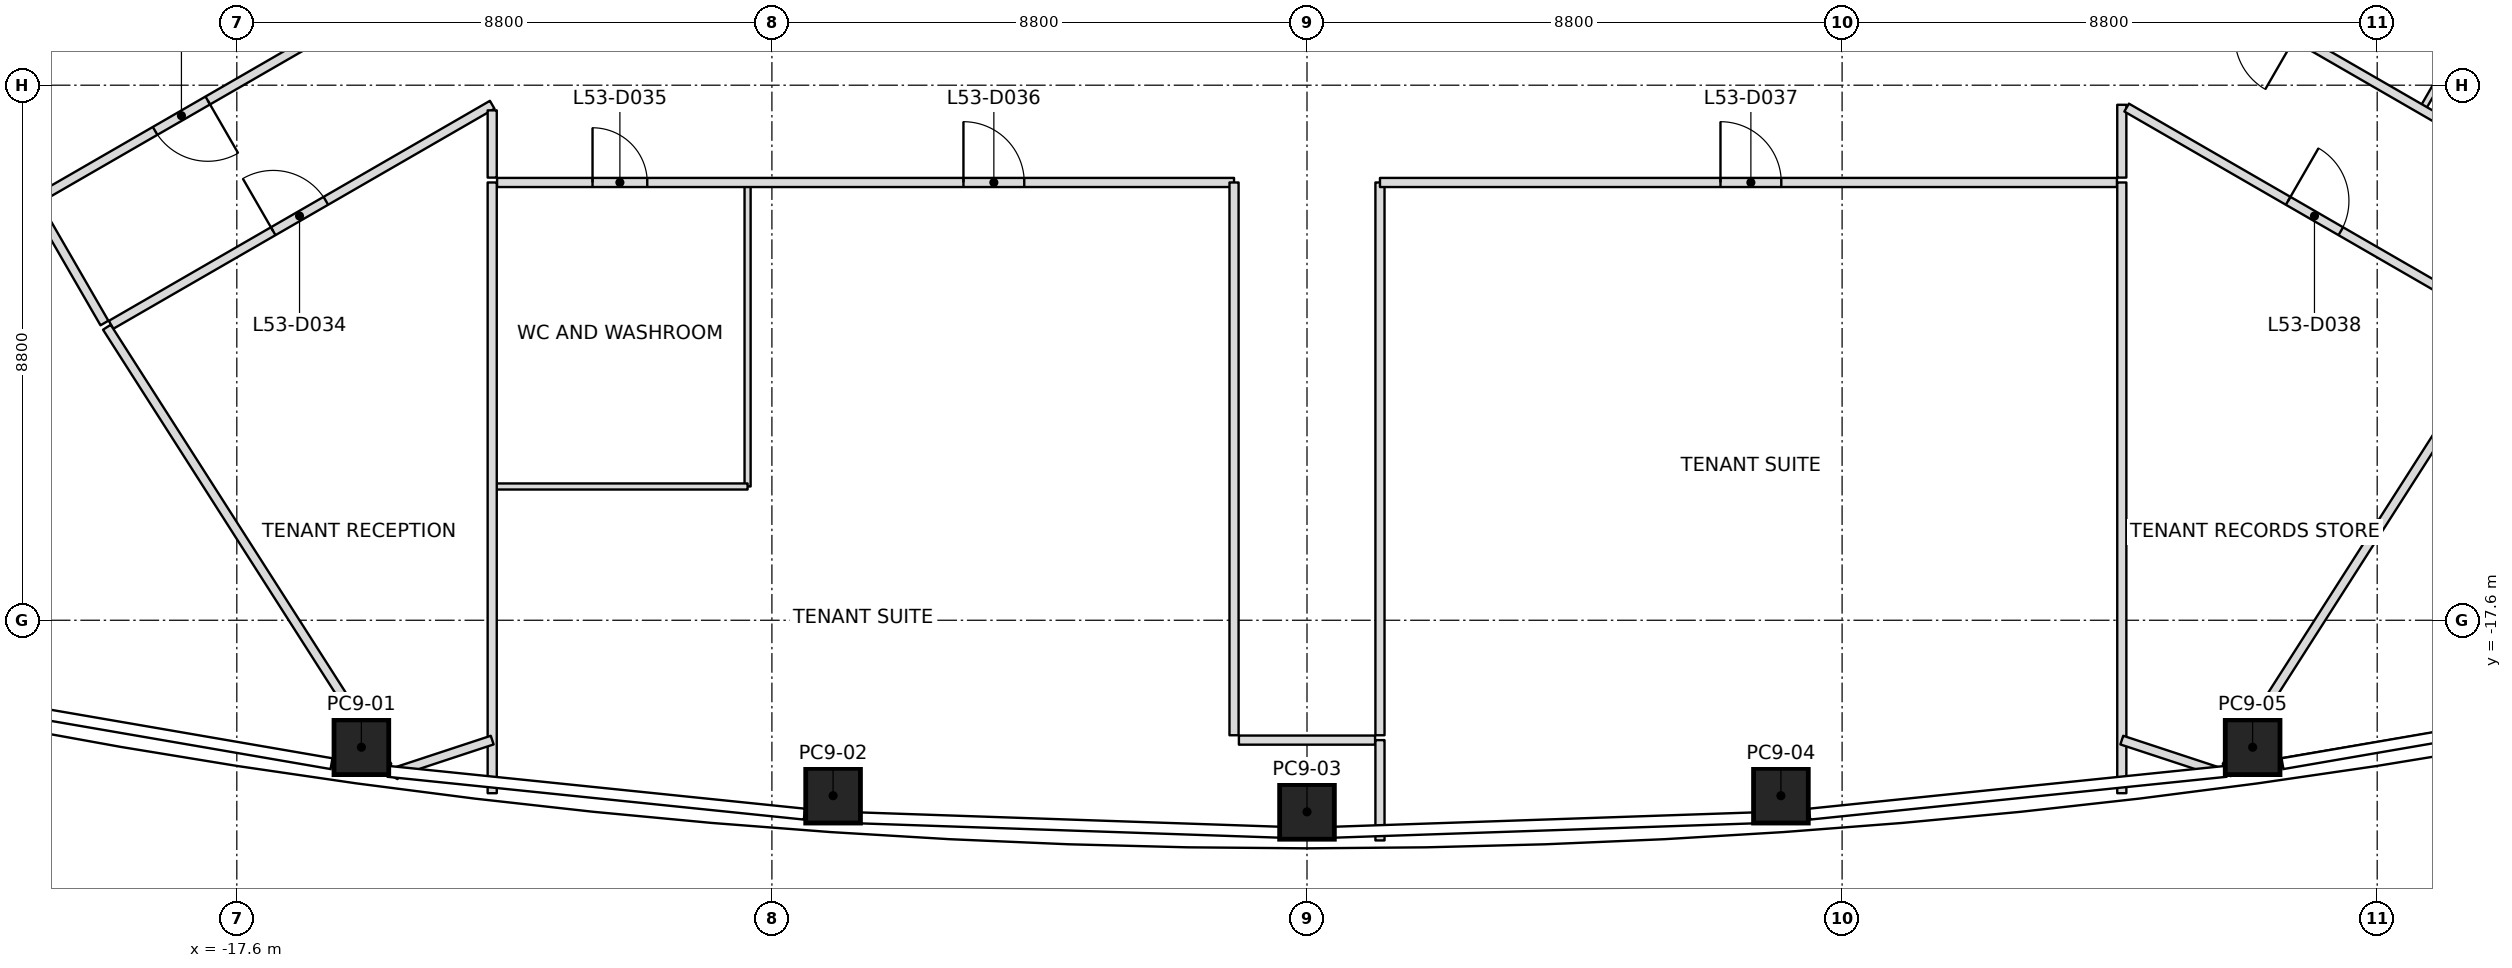
"""IFC4 building model, lengths in metres.
Left out: names, types, materials, properties, quantities, classifications, styles, units other than length and angle.
Written with IfcOpenShell. Run it as: python <this file> out.ifc"""

import sys

from ifc_helpers import new_model, si_unit, direction, frame, frame_2d, origin, origin_2d, place, context, subcontext, project, spatial, rectangle, extrude, element, fill, save


model = new_model("IFC4")
c1 = context("Model", 3, precision=1e-05, world=origin(), true_north=direction((0.0, 1.0)))
c2 = subcontext(c1, "Body", "Model", "MODEL_VIEW")
j1 = project(units=[si_unit("LENGTHUNIT", "METRE"), si_unit("PLANEANGLEUNIT", "RADIAN")], contexts=[c1])
p1 = place(None, origin())
s1 = spatial("IfcSite", under=j1, at=p1, CompositionType="ELEMENT")
p2 = place(p1, origin())
s2 = spatial("IfcBuilding", under=s1, at=p2, CompositionType="ELEMENT")
p3 = place(p2, frame((0.0, 0.0, 239.0)))
s3 = spatial("IfcBuildingStorey", under=s2, at=p3, CompositionType="ELEMENT", Elevation=239.0)
p4 = place(p3, frame((-15.552, -19.689, 0.0), z_axis=(0.017574453011, 0.010434831475, 0.999791104628), x_axis=(-0.990548112361, 0.136230512551, 0.015990139082)))
e1 = element("IfcColumn", 1, at=p4, inside=s3, PredefinedType="COLUMN", context=c2, shape_type="SweptSolid", body=[
    extrude(rectangle(XDim=0.9, YDim=0.9, at=origin_2d()), origin(), (0.0, 0.0, 1.0), 4.001),
])
p5 = place(p3, frame((-7.794, -20.485, 0.0), z_axis=(0.008788174922, 0.01116830563, 0.999899013366), x_axis=(-0.997634103873, 0.068279607313, 0.008005623951)))
e2 = element("IfcColumn", 2, at=p5, inside=s3, PredefinedType="COLUMN", context=c2, shape_type="SweptSolid", body=[
    extrude(rectangle(XDim=0.9, YDim=0.9, at=origin_2d()), origin(), (0.0, 0.0, 1.0), 4.0),
])
p6 = place(p3, frame((0.0, -20.751, 0.0), z_axis=(0.0, 0.01141283087, 0.999934871525), x_axis=(1.0, 0.0, 0.0)))
e3 = element("IfcColumn", 3, at=p6, inside=s3, PredefinedType="COLUMN", context=c2, shape_type="SweptSolid", body=[
    extrude(rectangle(XDim=0.9, YDim=0.9, at=origin_2d()), origin(), (0.0, 0.0, 1.0), 4.0),
])
p7 = place(p3, frame((7.794, -20.485, 0.0), z_axis=(-0.008788174922, 0.01116830563, 0.999899013366), x_axis=(0.997634103873, 0.068279607313, 0.008005623951)))
e4 = element("IfcColumn", 4, at=p7, inside=s3, PredefinedType="COLUMN", context=c2, shape_type="SweptSolid", body=[
    extrude(rectangle(XDim=0.9, YDim=0.9, at=origin_2d()), origin(), (0.0, 0.0, 1.0), 4.0),
])
p8 = place(p3, frame((15.552, -19.689, 0.0), z_axis=(-0.017574453011, 0.010434831475, 0.999791104628), x_axis=(0.990548112361, 0.136230512551, 0.015990139082)))
e5 = element("IfcColumn", 5, at=p8, inside=s3, PredefinedType="COLUMN", context=c2, shape_type="SweptSolid", body=[
    extrude(rectangle(XDim=0.9, YDim=0.9, at=origin_2d()), origin(), (0.0, 0.0, 1.0), 4.001),
])
p9 = place(p3, frame((-19.737, -12.781, 0.0), z_axis=(0.0, 0.0, 1.0), x_axis=(0.538422993962, -0.842674717535, 0.0)))
e6 = element("IfcWall", 6, at=p9, inside=s3, PredefinedType="PARTITIONING", context=c2, shape_type="SweptSolid", body=[
    extrude(rectangle(XDim=8.57, YDim=0.15, at=frame_2d((4.285, 0.0))), origin(), (0.0, 0.0, 1.0), 3.3),
])
p10 = place(p3, frame((-13.4, -10.4, 0.0), z_axis=(0.0, 0.0, 1.0), x_axis=(0.0, -1.0, 0.0)))
e7 = element("IfcWall", 7, at=p10, inside=s3, PredefinedType="PARTITIONING", context=c2, shape_type="SweptSolid", body=[
    extrude(rectangle(XDim=10.045, YDim=0.15, at=frame_2d((5.022, 0.0))), origin(), (0.0, 0.0, 1.0), 3.084),
])
p11 = place(p3, frame((-13.4, -19.571, 0.0), z_axis=(0.0, 0.0, 1.0), x_axis=(-0.949797873729, -0.312864186286, 0.0)))
e8 = element("IfcWall", 8, at=p11, inside=s3, PredefinedType="PARTITIONING", context=c2, shape_type="SweptSolid", body=[
    extrude(rectangle(XDim=1.656, YDim=0.15, at=frame_2d((0.828, 0.0))), origin(), (0.0, 0.0, 1.0), 3.084),
])
p12 = place(p3, frame((-15.023, -20.176, 0.0), z_axis=(0.0, 0.0, 1.0), x_axis=(0.492769953399, 0.870159625027, 0.0)))
e9 = element("IfcWall", 9, at=p12, inside=s3, PredefinedType="PARTITIONING", context=c2, shape_type="SweptSolid", body=[
    extrude(rectangle(XDim=0.102, YDim=0.15, at=frame_2d((0.051, 0.0))), origin(), (0.0, 0.0, 1.0), 3.3),
])
p13 = place(p3, frame((1.2, -19.571, 0.0), z_axis=(0.0, 0.0, 1.0), x_axis=(0.0, -1.0, 0.0)))
e10 = element("IfcWall", 10, at=p13, inside=s3, PredefinedType="PARTITIONING", context=c2, shape_type="SweptSolid", body=[
    extrude(rectangle(XDim=1.65, YDim=0.15, at=frame_2d((0.825, 0.0))), origin(), (0.0, 0.0, 1.0), 3.084),
])
p14 = place(p3, frame((13.4, -10.4, 0.0), z_axis=(0.0, 0.0, 1.0), x_axis=(0.0, -1.0, 0.0)))
e11 = element("IfcWall", 11, at=p14, inside=s3, PredefinedType="PARTITIONING", context=c2, shape_type="SweptSolid", body=[
    extrude(rectangle(XDim=10.045, YDim=0.15, at=frame_2d((5.022, 0.0))), origin(), (0.0, 0.0, 1.0), 3.084),
])
p15 = place(p3, frame((13.4, -19.571, 0.0), z_axis=(0.0, 0.0, 1.0), x_axis=(0.949797873729, -0.312864186286, 0.0)))
e12 = element("IfcWall", 12, at=p15, inside=s3, PredefinedType="PARTITIONING", context=c2, shape_type="SweptSolid", body=[
    extrude(rectangle(XDim=1.656, YDim=0.15, at=frame_2d((0.828, 0.0))), origin(), (0.0, 0.0, 1.0), 3.084),
])
p16 = place(p3, frame((15.173, -20.089, 0.0), z_axis=(0.0, 0.0, 1.0), x_axis=(0.986019050289, 0.166632627261, 0.0)))
e13 = element("IfcWall", 13, at=p16, inside=s3, PredefinedType="PARTITIONING", context=c2, shape_type="SweptSolid", body=[
    extrude(rectangle(XDim=4.466, YDim=0.15, at=frame_2d((2.233, 0.0))), origin(), (0.0, 0.0, 1.0), 3.3),
])
p17 = place(p3, frame((19.737, -12.781, 0.0), z_axis=(0.0, 0.0, 1.0), x_axis=(-0.538422993962, -0.842674717535, 0.0)))
e14 = element("IfcWall", 14, at=p17, inside=s3, PredefinedType="PARTITIONING", context=c2, shape_type="SweptSolid", body=[
    extrude(rectangle(XDim=8.57, YDim=0.15, at=frame_2d((4.285, 0.0))), origin(), (0.0, 0.0, 1.0), 3.3),
])
p18 = place(p3, frame((-20.897, -10.772, 0.0), z_axis=(0.0, 0.0, 1.0), x_axis=(0.500030632641, -0.866007717299, 0.0)))
e15 = element("IfcWall", 15, at=p18, inside=s3, PredefinedType="PARTITIONING", context=c2, shape_type="SweptSolid", body=[
    extrude(rectangle(XDim=2.24, YDim=0.15, at=frame_2d((1.12, 0.0))), origin(), (0.0, 0.0, 1.0), 3.233),
])
p19 = place(p3, frame((-13.4, -6.351, 0.0), z_axis=(0.0, 0.0, 1.0), x_axis=(-0.866032359495, -0.499987952162, 0.0)))
e16 = element("IfcWall", 16, at=p19, inside=s3, PredefinedType="PARTITIONING", context=c2, shape_type="SweptSolid", body=[
    extrude(rectangle(XDim=8.623, YDim=0.15, at=frame_2d((4.312, 0.0))), origin(), (0.0, 0.0, 1.0), 3.3),
])
p20 = place(p19, frame((1.05, 0.0, 0.0)))
e17 = element("IfcOpeningElement", 17, at=p20, cuts=e16, PredefinedType="OPENING", context=c2, shape_type="SweptSolid", body=[
    extrude(rectangle(XDim=0.9, YDim=2.1, at=frame_2d((0.45, 1.05))), frame((0.0, 0.075, 0.0), z_axis=(0.0, -1.0, 0.0), x_axis=(1.0, 0.0, 0.0)), (0.0, 0.0, 1.0), 0.15),
])
p21 = place(p19, frame((5.402, 0.0, 0.0)))
e18 = element("IfcOpeningElement", 18, at=p21, cuts=e16, PredefinedType="OPENING", context=c2, shape_type="SweptSolid", body=[
    extrude(rectangle(XDim=1.0, YDim=2.1, at=frame_2d((0.5, 1.05))), frame((0.0, 0.075, 0.0), z_axis=(0.0, -1.0, 0.0), x_axis=(1.0, 0.0, 0.0)), (0.0, 0.0, 1.0), 0.15),
])
p22 = place(p3, frame((-19.668, -12.741, 0.0), z_axis=(0.0, 0.0, 1.0), x_axis=(0.866023808947, 0.500002762329, 0.0)))
e19 = element("IfcWall", 19, at=p22, inside=s3, PredefinedType="PARTITIONING", context=c2, shape_type="SweptSolid", body=[
    extrude(rectangle(XDim=7.238, YDim=0.15, at=frame_2d((3.619, 0.0))), origin(), (0.0, 0.0, 1.0), 3.233),
])
p23 = place(p22, frame((3.079, 0.0, 0.0)))
e20 = element("IfcOpeningElement", 20, at=p23, cuts=e19, PredefinedType="OPENING", context=c2, shape_type="SweptSolid", body=[
    extrude(rectangle(XDim=1.0, YDim=2.1, at=frame_2d((0.5, 1.05))), frame((0.0, 0.075, 0.0), z_axis=(0.0, -1.0, 0.0), x_axis=(1.0, 0.0, 0.0)), (0.0, 0.0, 1.0), 0.15),
])
p24 = place(p3, frame((-13.4, -9.214, 0.0), z_axis=(0.0, 0.0, 1.0), x_axis=(0.0, -1.0, 0.0)))
e21 = element("IfcWall", 21, at=p24, inside=s3, PredefinedType="PARTITIONING", context=c2, shape_type="SweptSolid", body=[
    extrude(rectangle(XDim=1.106, YDim=0.15, at=frame_2d((0.553, 0.0))), origin(), (0.0, 0.0, 1.0), 3.233),
])
p25 = place(p3, frame((-13.32, -10.4, 0.0), z_axis=(0.0, 0.0, 1.0), x_axis=(1.0, 0.0, 0.0)))
e22 = element("IfcWall", 22, at=p25, inside=s3, PredefinedType="PARTITIONING", context=c2, shape_type="SweptSolid", body=[
    extrude(rectangle(XDim=12.12, YDim=0.15, at=frame_2d((6.06, 0.0))), origin(), (0.0, 0.0, 1.0), 3.167),
])
p26 = place(p25, frame((1.57, 0.0, 0.0)))
e23 = element("IfcOpeningElement", 23, at=p26, cuts=e22, PredefinedType="OPENING", context=c2, shape_type="SweptSolid", body=[
    extrude(rectangle(XDim=0.9, YDim=2.1, at=frame_2d((0.45, 1.05))), frame((0.0, 0.075, 0.0), z_axis=(0.0, -1.0, 0.0), x_axis=(1.0, 0.0, 0.0)), (0.0, 0.0, 1.0), 0.15),
])
p27 = place(p25, frame((7.67, 0.0, 0.0)))
e24 = element("IfcOpeningElement", 24, at=p27, cuts=e22, PredefinedType="OPENING", context=c2, shape_type="SweptSolid", body=[
    extrude(rectangle(XDim=1.0, YDim=2.1, at=frame_2d((0.5, 1.05))), frame((0.0, 0.075, 0.0), z_axis=(0.0, -1.0, 0.0), x_axis=(1.0, 0.0, 0.0)), (0.0, 0.0, 1.0), 0.15),
])
p28 = place(p3, frame((-1.2, -10.4, 0.0), z_axis=(0.0, 0.0, 1.0), x_axis=(0.0, -1.0, 0.0)))
e25 = element("IfcWall", 25, at=p28, inside=s3, PredefinedType="PARTITIONING", context=c2, shape_type="SweptSolid", body=[
    extrude(rectangle(XDim=9.092, YDim=0.15, at=frame_2d((4.546, 0.0))), origin(), (0.0, 0.0, 1.0), 3.3),
])
p29 = place(p3, frame((-1.12, -19.571, 0.0), z_axis=(0.0, 0.0, 1.0), x_axis=(1.0, 0.0, 0.0)))
e26 = element("IfcWall", 26, at=p29, inside=s3, PredefinedType="PARTITIONING", context=c2, shape_type="SweptSolid", body=[
    extrude(rectangle(XDim=2.24, YDim=0.15, at=frame_2d((1.12, 0.0))), origin(), (0.0, 0.0, 1.0), 3.3),
])
p30 = place(p3, frame((1.2, -19.491, 0.0), z_axis=(0.0, 0.0, 1.0), x_axis=(0.0, 1.0, 0.0)))
e27 = element("IfcWall", 27, at=p30, inside=s3, PredefinedType="PARTITIONING", context=c2, shape_type="SweptSolid", body=[
    extrude(rectangle(XDim=9.092, YDim=0.15, at=frame_2d((4.546, 0.0))), origin(), (0.0, 0.0, 1.0), 3.3),
])
p31 = place(p3, frame((1.2, -10.4, 0.0), z_axis=(0.0, 0.0, 1.0), x_axis=(1.0, 0.0, 0.0)))
e28 = element("IfcWall", 28, at=p31, inside=s3, PredefinedType="PARTITIONING", context=c2, shape_type="SweptSolid", body=[
    extrude(rectangle(XDim=12.12, YDim=0.15, at=frame_2d((6.06, 0.0))), origin(), (0.0, 0.0, 1.0), 3.167),
])
p32 = place(p31, frame((5.6, 0.0, 0.0)))
e29 = element("IfcOpeningElement", 29, at=p32, cuts=e28, PredefinedType="OPENING", context=c2, shape_type="SweptSolid", body=[
    extrude(rectangle(XDim=1.0, YDim=2.1, at=frame_2d((0.5, 1.05))), frame((0.0, 0.075, 0.0), z_axis=(0.0, -1.0, 0.0), x_axis=(1.0, 0.0, 0.0)), (0.0, 0.0, 1.0), 0.15),
])
p33 = place(p3, frame((13.4, -10.32, 0.0), z_axis=(0.0, 0.0, 1.0), x_axis=(0.0, 1.0, 0.0)))
e30 = element("IfcWall", 30, at=p33, inside=s3, PredefinedType="PARTITIONING", context=c2, shape_type="SweptSolid", body=[
    extrude(rectangle(XDim=1.198, YDim=0.15, at=frame_2d((0.599, 0.0))), origin(), (0.0, 0.0, 1.0), 3.233),
])
p34 = place(p3, frame((13.479, -9.168, 0.0), z_axis=(0.0, 0.0, 1.0), x_axis=(0.866029131345, -0.49999354362, 0.0)))
e31 = element("IfcWall", 31, at=p34, inside=s3, PredefinedType="PARTITIONING", context=c2, shape_type="SweptSolid", body=[
    extrude(rectangle(XDim=7.146, YDim=0.15, at=frame_2d((3.573, 0.0))), origin(), (0.0, 0.0, 1.0), 3.233),
])
p35 = place(p34, frame((3.067, 0.0, 0.0)))
e32 = element("IfcOpeningElement", 32, at=p35, cuts=e31, PredefinedType="OPENING", context=c2, shape_type="SweptSolid", body=[
    extrude(rectangle(XDim=1.0, YDim=2.1, at=frame_2d((0.5, 1.05))), frame((0.0, 0.075, 0.0), z_axis=(0.0, -1.0, 0.0), x_axis=(1.0, 0.0, 0.0)), (0.0, 0.0, 1.0), 0.15),
])
p36 = place(p3, frame((20.868, -10.662, 0.0), z_axis=(0.0, 0.0, 1.0), x_axis=(-0.866032359495, 0.499987952162, 0.0)))
e33 = element("IfcWall", 33, at=p36, inside=s3, PredefinedType="PARTITIONING", context=c2, shape_type="SweptSolid", body=[
    extrude(rectangle(XDim=8.623, YDim=0.15, at=frame_2d((4.312, 0.0))), origin(), (0.0, 0.0, 1.0), 3.3),
])
p37 = place(p36, frame((0.97, 0.0, 0.0)))
e34 = element("IfcOpeningElement", 34, at=p37, cuts=e33, PredefinedType="OPENING", context=c2, shape_type="SweptSolid", body=[
    extrude(rectangle(XDim=0.9, YDim=2.1, at=frame_2d((0.45, 1.05))), frame((0.0, 0.075, 0.0), z_axis=(0.0, -1.0, 0.0), x_axis=(1.0, 0.0, 0.0)), (0.0, 0.0, 1.0), 0.15),
])
p38 = place(p36, frame((5.322, 0.0, 0.0)))
e35 = element("IfcOpeningElement", 35, at=p38, cuts=e33, PredefinedType="OPENING", context=c2, shape_type="SweptSolid", body=[
    extrude(rectangle(XDim=1.0, YDim=2.1, at=frame_2d((0.5, 1.05))), frame((0.0, 0.075, 0.0), z_axis=(0.0, -1.0, 0.0), x_axis=(1.0, 0.0, 0.0)), (0.0, 0.0, 1.0), 0.15),
])
p39 = place(p3, frame((-9.2, -10.43, 0.0), z_axis=(0.0, 0.0, 1.0), x_axis=(0.0, -1.0, 0.0)))
e36 = element("IfcWall", 36, at=p39, inside=s3, PredefinedType="PARTITIONING", context=c2, shape_type="SweptSolid", body=[
    extrude(rectangle(XDim=4.97, YDim=0.1, at=frame_2d((2.485, 0.0))), origin(), (0.0, 0.0, 1.0), 3.3),
])
p40 = place(p3, frame((-9.2, -15.4, 0.0), z_axis=(0.0, 0.0, 1.0), x_axis=(-1.0, 0.0, 0.0)))
e37 = element("IfcWall", 37, at=p40, inside=s3, PredefinedType="PARTITIONING", context=c2, shape_type="SweptSolid", body=[
    extrude(rectangle(XDim=4.17, YDim=0.1, at=frame_2d((2.085, 0.0))), origin(), (0.0, 0.0, 1.0), 3.243),
])
p41 = place(p3, frame((18.354, -9.177, 0.0), z_axis=(0.0, 0.0, 1.0), x_axis=(0.500022371132, 0.86601248742, 0.0)))
e38 = element("IfcWall", 38, at=p41, inside=s3, PredefinedType="PARTITIONING", context=c2, shape_type="SweptSolid", body=[
    extrude(rectangle(XDim=3.57, YDim=0.1, at=frame_2d((1.785, 0.0))), origin(), (0.0, 0.0, 1.0), 3.3),
])
p42 = place(p21, origin())
e39 = element("IfcDoor", 39, at=p42, inside=s3, OperationType="SINGLE_SWING_LEFT", PredefinedType="DOOR", context=c2, shape_type="SweptSolid", body=[
    extrude(rectangle(XDim=1.0, YDim=2.1, at=frame_2d((0.5, 1.05))), frame((0.0, 0.025, 0.0), z_axis=(0.0, -1.0, 0.0), x_axis=(1.0, 0.0, 0.0)), (0.0, 0.0, 1.0), 0.05),
])
fill(e18, e39)
p43 = place(p23, origin())
e40 = element("IfcDoor", 40, at=p43, inside=s3, OperationType="SINGLE_SWING_LEFT", PredefinedType="DOOR", context=c2, shape_type="SweptSolid", body=[
    extrude(rectangle(XDim=1.0, YDim=2.1, at=frame_2d((0.5, 1.05))), frame((0.0, 0.025, 0.0), z_axis=(0.0, -1.0, 0.0), x_axis=(1.0, 0.0, 0.0)), (0.0, 0.0, 1.0), 0.05),
])
fill(e20, e40)
p44 = place(p26, origin())
e41 = element("IfcDoor", 41, at=p44, inside=s3, OperationType="SINGLE_SWING_RIGHT", PredefinedType="DOOR", context=c2, shape_type="SweptSolid", body=[
    extrude(rectangle(XDim=0.9, YDim=2.1, at=frame_2d((0.45, 1.05))), frame((0.0, 0.025, 0.0), z_axis=(0.0, -1.0, 0.0), x_axis=(1.0, 0.0, 0.0)), (0.0, 0.0, 1.0), 0.05),
])
fill(e23, e41)
p45 = place(p27, origin())
e42 = element("IfcDoor", 42, at=p45, inside=s3, OperationType="SINGLE_SWING_LEFT", PredefinedType="DOOR", context=c2, shape_type="SweptSolid", body=[
    extrude(rectangle(XDim=1.0, YDim=2.1, at=frame_2d((0.5, 1.05))), frame((0.0, 0.025, 0.0), z_axis=(0.0, -1.0, 0.0), x_axis=(1.0, 0.0, 0.0)), (0.0, 0.0, 1.0), 0.05),
])
fill(e24, e42)
p46 = place(p32, origin())
e43 = element("IfcDoor", 43, at=p46, inside=s3, OperationType="SINGLE_SWING_LEFT", PredefinedType="DOOR", context=c2, shape_type="SweptSolid", body=[
    extrude(rectangle(XDim=1.0, YDim=2.1, at=frame_2d((0.5, 1.05))), frame((0.0, 0.025, 0.0), z_axis=(0.0, -1.0, 0.0), x_axis=(1.0, 0.0, 0.0)), (0.0, 0.0, 1.0), 0.05),
])
fill(e29, e43)
p47 = place(p35, origin())
e44 = element("IfcDoor", 44, at=p47, inside=s3, OperationType="SINGLE_SWING_LEFT", PredefinedType="DOOR", context=c2, shape_type="SweptSolid", body=[
    extrude(rectangle(XDim=1.0, YDim=2.1, at=frame_2d((0.5, 1.05))), frame((0.0, 0.025, 0.0), z_axis=(0.0, -1.0, 0.0), x_axis=(1.0, 0.0, 0.0)), (0.0, 0.0, 1.0), 0.05),
])
fill(e32, e44)
save(model, sys.argv[1])
